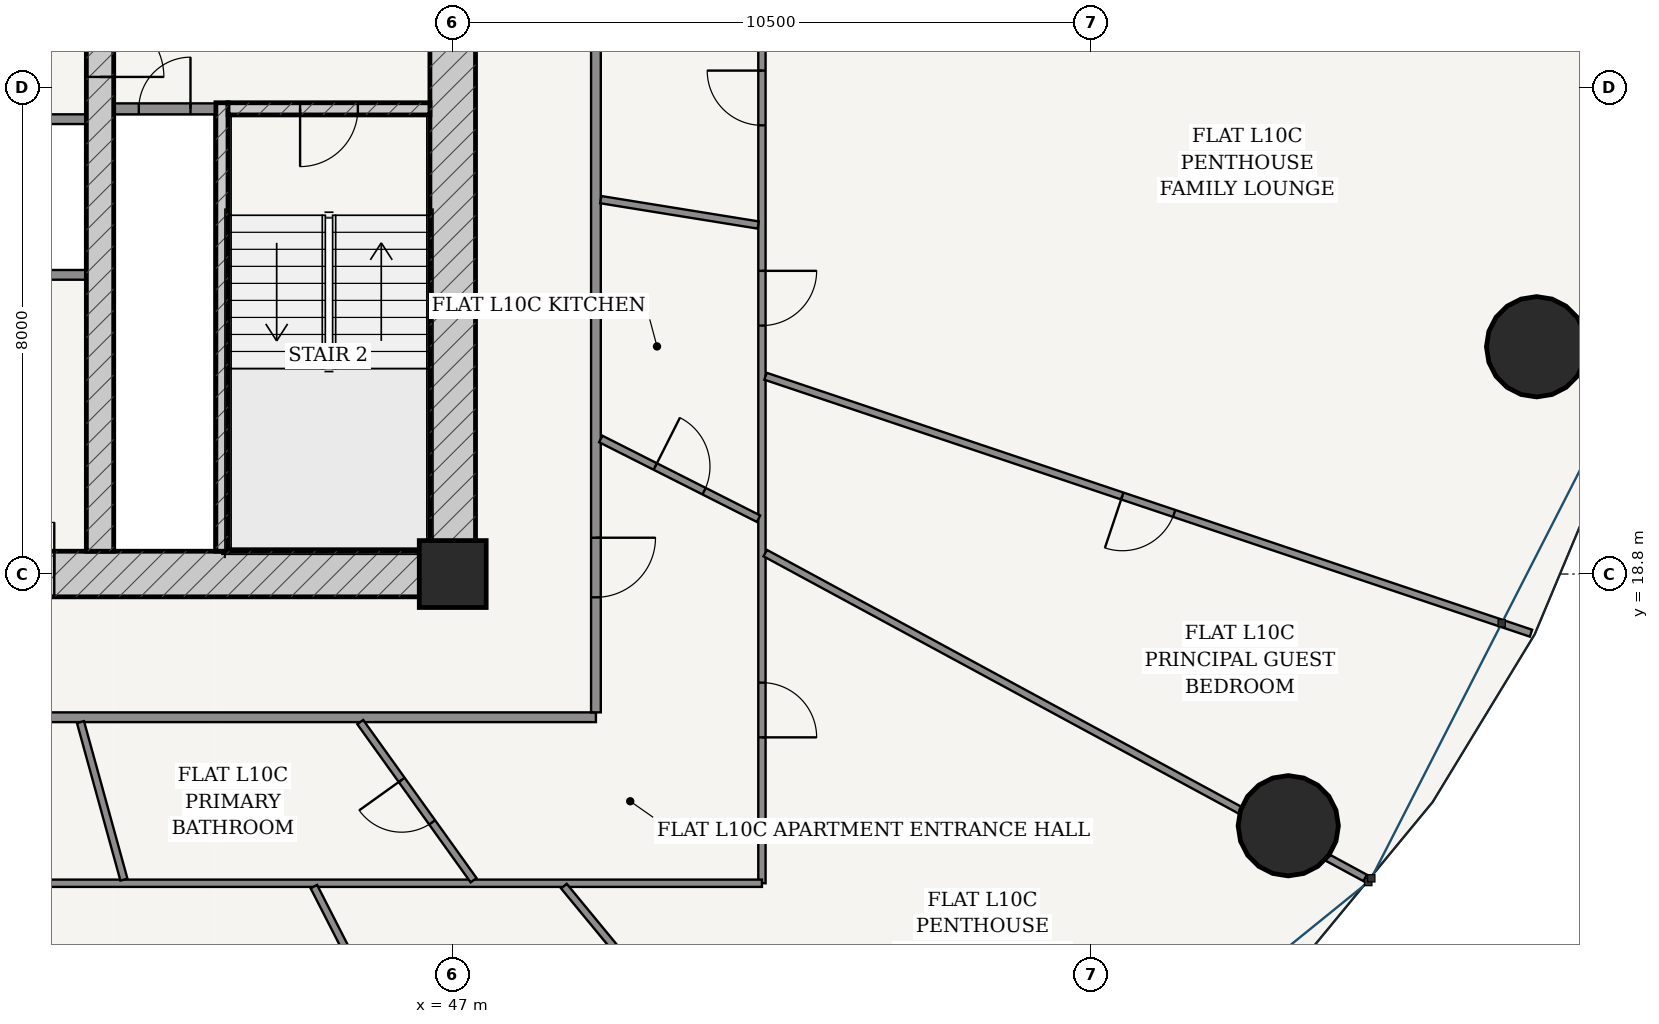
"""IFC4 building model, lengths in metres.
Left out: names, types, materials, properties, quantities, classifications, styles, units other than length and angle.
Written with IfcOpenShell. Run it as: python <this file> out.ifc"""

import sys

from ifc_helpers import new_model, si_unit, direction, frame, frame_2d, origin, origin_2d, place, context, subcontext, project, spatial, rectangle, hollow_circle, extrude, source, transform, mapped, element, fill, save


model = new_model("IFC4")
c1 = context("Model", 3, precision=1e-05, world=origin(), true_north=direction((-0.2419218956, 0.970295726276)))
c2 = subcontext(c1, "Body", "Model", "MODEL_VIEW")
j1 = project(units=[si_unit("LENGTHUNIT", "METRE"), si_unit("PLANEANGLEUNIT", "RADIAN")], contexts=[c1])
p1 = place(None, origin())
s1 = spatial("IfcSite", under=j1, at=p1, CompositionType="ELEMENT")
p2 = place(p1, origin())
s2 = spatial("IfcBuilding", under=s1, at=p2, CompositionType="ELEMENT")
p3 = place(p2, frame((0.0, 0.0, 42.0)))
s3 = spatial("IfcBuildingStorey", under=s2, at=p3, CompositionType="ELEMENT", Elevation=42.0)
p4 = place(p3, frame((47.0, 18.8, 0.0), z_axis=(0.0, 0.0, 1.0), x_axis=(1.0, 0.0, 0.0)))
e1 = element("IfcColumn", 1, at=p4, inside=s3, PredefinedType="COLUMN", context=c2, shape_type="SweptSolid", body=[
    extrude(rectangle(XDim=1.1, YDim=1.1, at=origin_2d()), origin(), (0.0, 0.0, 1.0), 3.6),
])
p5 = place(p3, frame((28.625, 18.8, 0.0), z_axis=(0.0, 0.0, 1.0), x_axis=(1.0, 0.0, 0.0)))
e2 = element("IfcWall", 2, at=p5, inside=s3, PredefinedType="SHEAR", context=c2, shape_type="SweptSolid", body=[
    extrude(rectangle(XDim=18.75, YDim=0.75, at=frame_2d((9.375, 0.0))), origin(), (0.0, 0.0, 1.0), 3.32),
])
p6 = place(p5, frame((6.927, 0.0, 0.0)))
e3 = element("IfcOpeningElement", 3, at=p6, cuts=e2, PredefinedType="OPENING", context=c2, shape_type="SweptSolid", body=[
    extrude(rectangle(XDim=0.85, YDim=2.1, at=frame_2d((0.425, 1.05))), frame((0.0, 0.385, 0.0), z_axis=(0.0, -1.0, 0.0), x_axis=(1.0, 0.0, 0.0)), (0.0, 0.0, 1.0), 0.77),
])
p7 = place(p5, frame((8.95, 0.0, 0.0)))
e4 = element("IfcOpeningElement", 4, at=p7, cuts=e2, PredefinedType="OPENING", context=c2, shape_type="SweptSolid", body=[
    extrude(rectangle(XDim=0.85, YDim=2.1, at=frame_2d((0.425, 1.05))), frame((0.0, 0.385, 0.0), z_axis=(0.0, -1.0, 0.0), x_axis=(1.0, 0.0, 0.0)), (0.0, 0.0, 1.0), 0.77),
])
p8 = place(p5, frame((10.972, 0.0, 0.0)))
e5 = element("IfcOpeningElement", 5, at=p8, cuts=e2, PredefinedType="OPENING", context=c2, shape_type="SweptSolid", body=[
    extrude(rectangle(XDim=0.85, YDim=2.1, at=frame_2d((0.425, 1.05))), frame((0.0, 0.385, 0.0), z_axis=(0.0, -1.0, 0.0), x_axis=(1.0, 0.0, 0.0)), (0.0, 0.0, 1.0), 0.77),
])
p9 = place(p3, frame((47.0, 19.175, 0.0), z_axis=(0.0, 0.0, 1.0), x_axis=(0.0, 1.0, 0.0)))
e6 = element("IfcWall", 6, at=p9, inside=s3, PredefinedType="SHEAR", context=c2, shape_type="SweptSolid", body=[
    extrude(rectangle(XDim=15.25, YDim=0.75, at=frame_2d((7.625, 0.0))), origin(), (0.0, 0.0, 1.0), 3.32),
])
p10 = place(p9, frame((9.875, 0.0, 0.0)))
e7 = element("IfcOpeningElement", 7, at=p10, cuts=e6, PredefinedType="OPENING", context=c2, shape_type="SweptSolid", body=[
    extrude(rectangle(XDim=1.5, YDim=2.2, at=frame_2d((0.75, 1.1))), frame((0.0, 0.385, 0.0), z_axis=(0.0, -1.0, 0.0), x_axis=(1.0, 0.0, 0.0)), (0.0, 0.0, 1.0), 0.77),
])
p11 = place(p3, frame((43.205, 19.175, 0.0), z_axis=(0.0, 0.0, 1.0), x_axis=(0.0, 1.0, 0.0)))
e8 = element("IfcWall", 8, at=p11, inside=s3, PredefinedType="SOLIDWALL", context=c2, shape_type="SweptSolid", body=[
    extrude(rectangle(XDim=7.375, YDim=0.2, at=frame_2d((3.688, 0.0))), origin(), (0.0, 0.0, 1.0), 3.32),
])
p12 = place(p3, frame((43.305, 26.45, 0.0), z_axis=(0.0, 0.0, 1.0), x_axis=(1.0, 0.0, 0.0)))
e9 = element("IfcWall", 9, at=p12, inside=s3, PredefinedType="SOLIDWALL", context=c2, shape_type="SweptSolid", body=[
    extrude(rectangle(XDim=3.32, YDim=0.2, at=frame_2d((1.66, 0.0))), origin(), (0.0, 0.0, 1.0), 3.32),
])
p13 = place(p12, frame((1.185, 0.0, 0.0)))
e10 = element("IfcOpeningElement", 10, at=p13, cuts=e9, PredefinedType="OPENING", context=c2, shape_type="SweptSolid", body=[
    extrude(rectangle(XDim=0.95, YDim=2.15, at=frame_2d((0.475, 1.075))), frame((0.0, 0.11, 0.0), z_axis=(0.0, -1.0, 0.0), x_axis=(1.0, 0.0, 0.0)), (0.0, 0.0, 1.0), 0.22),
])
p14 = place(p3, frame((41.2, 19.175, 0.0), z_axis=(0.0, 0.0, 1.0), x_axis=(0.0, 1.0, 0.0)))
e11 = element("IfcWall", 11, at=p14, inside=s3, PredefinedType="SHEAR", context=c2, shape_type="SweptSolid", body=[
    extrude(rectangle(XDim=15.25, YDim=0.45, at=frame_2d((7.625, 0.0))), origin(), (0.0, 0.0, 1.0), 3.32),
])
p15 = place(p14, frame((7.8, 0.0, 0.0)))
e12 = element("IfcOpeningElement", 12, at=p15, cuts=e11, PredefinedType="OPENING", context=c2, shape_type="SweptSolid", body=[
    extrude(rectangle(XDim=1.05, YDim=2.15, at=frame_2d((0.525, 1.075))), frame((0.0, 0.235, 0.0), z_axis=(0.0, -1.0, 0.0), x_axis=(1.0, 0.0, 0.0)), (0.0, 0.0, 1.0), 0.47),
])
for number, where, z_axis, x_axis in (
    (13, (60.741, 14.661, 0.0), (0.0, 0.0, 1.0), (1.0, 0.0, 0.0)),
    (14, (64.824, 22.537, 0.0), (0.0, 0.0, 1.0), (1.0, 0.0, 0.0)),
):
    element("IfcColumn", number, at=place(p3, frame(where, z_axis=z_axis, x_axis=x_axis)), inside=s3, PredefinedType="COLUMN", context=c2, shape_type="SweptSolid", body=[
        extrude(hollow_circle(Radius=0.825, WallThickness=0.05, at=origin_2d()), origin(), (0.0, 0.0, 1.0), 3.6),
    ])
p16 = place(p3, frame((41.425, 26.45, 0.0), z_axis=(0.0, 0.0, 1.0), x_axis=(1.0, 0.0, 0.0)))
e15 = element("IfcWall", 15, at=p16, inside=s3, PredefinedType="PARTITIONING", context=c2, shape_type="SweptSolid", body=[
    extrude(rectangle(XDim=1.675, YDim=0.18, at=frame_2d((0.837, 0.0))), origin(), (0.0, 0.0, 1.0), 3.32),
])
p17 = place(p16, frame((0.413, 0.0, 0.0)))
e16 = element("IfcOpeningElement", 16, at=p17, cuts=e15, PredefinedType="OPENING", context=c2, shape_type="SweptSolid", body=[
    extrude(rectangle(XDim=0.85, YDim=2.1, at=frame_2d((0.425, 1.05))), frame((0.0, 0.1, 0.0), z_axis=(0.0, -1.0, 0.0), x_axis=(1.0, 0.0, 0.0)), (0.0, 0.0, 1.0), 0.2),
])
for number, where, z_axis, x_axis in (
    (17, (35.025, 26.28, 0.0), (0.0, 0.0, 1.0), (1.0, 0.0, 0.0)),
    (18, (35.025, 23.72, 0.0), (0.0, 0.0, 1.0), (1.0, 0.0, 0.0)),
):
    element("IfcWall", number, at=place(p3, frame(where, z_axis=z_axis, x_axis=x_axis)), inside=s3, PredefinedType="PARTITIONING", context=c2, shape_type="SweptSolid", body=[
        extrude(rectangle(XDim=5.95, YDim=0.16, at=frame_2d((2.975, 0.0))), origin(), (0.0, 0.0, 1.0), 3.32),
    ])
p18 = place(p3, frame((26.645, 16.445, 0.0), z_axis=(0.0, 0.0, 1.0), x_axis=(1.0, 0.0, 0.0)))
e19 = element("IfcWall", 19, at=p18, inside=s3, PredefinedType="PARTITIONING", context=c2, shape_type="SweptSolid", body=[
    extrude(rectangle(XDim=22.71, YDim=0.16, at=frame_2d((11.355, 0.0))), origin(), (0.0, 0.0, 1.0), 2.688),
])
p19 = place(p3, frame((49.355, 16.525, 0.0), z_axis=(0.0, 0.0, 1.0), x_axis=(0.0, 1.0, 0.0)))
e20 = element("IfcWall", 20, at=p19, inside=s3, PredefinedType="PARTITIONING", context=c2, shape_type="SweptSolid", body=[
    extrude(rectangle(XDim=20.55, YDim=0.16, at=frame_2d((10.275, 0.0))), origin(), (0.0, 0.0, 1.0), 2.688),
])
p20 = place(p19, frame((17.207, 0.0, 0.0)))
e21 = element("IfcOpeningElement", 21, at=p20, cuts=e20, PredefinedType="OPENING", context=c2, shape_type="SweptSolid", body=[
    extrude(rectangle(XDim=0.98, YDim=2.2, at=frame_2d((0.49, 1.1))), frame((0.0, 0.09, 0.0), z_axis=(0.0, -1.0, 0.0), x_axis=(1.0, 0.0, 0.0)), (0.0, 0.0, 1.0), 0.18),
])
p21 = place(p19, frame((1.892, 0.0, 0.0)))
e22 = element("IfcOpeningElement", 22, at=p21, cuts=e20, PredefinedType="OPENING", context=c2, shape_type="SweptSolid", body=[
    extrude(rectangle(XDim=0.98, YDim=2.2, at=frame_2d((0.49, 1.1))), frame((0.0, 0.09, 0.0), z_axis=(0.0, -1.0, 0.0), x_axis=(1.0, 0.0, 0.0)), (0.0, 0.0, 1.0), 0.18),
])
p22 = place(p3, frame((52.085, 28.968, 0.0), z_axis=(0.0, 0.0, 1.0), x_axis=(0.0, -1.0, 0.0)))
e23 = element("IfcWall", 23, at=p22, inside=s3, PredefinedType="PARTITIONING", context=c2, shape_type="SweptSolid", body=[
    extrude(rectangle(XDim=15.253, YDim=0.12, at=frame_2d((7.626, 0.0))), origin(), (0.0, 0.0, 1.0), 2.688),
])
p23 = place(p22, frame((11.954, 0.0, 0.0)))
e24 = element("IfcOpeningElement", 24, at=p23, cuts=e23, PredefinedType="OPENING", context=c2, shape_type="SweptSolid", body=[
    extrude(rectangle(XDim=0.9, YDim=2.15, at=frame_2d((0.45, 1.075))), frame((0.0, 0.07, 0.0), z_axis=(0.0, -1.0, 0.0), x_axis=(1.0, 0.0, 0.0)), (0.0, 0.0, 1.0), 0.14),
])
p24 = place(p22, frame((5.182, 0.0, 0.0)))
e25 = element("IfcOpeningElement", 25, at=p24, cuts=e23, PredefinedType="OPENING", context=c2, shape_type="SweptSolid", body=[
    extrude(rectangle(XDim=0.9, YDim=2.15, at=frame_2d((0.45, 1.075))), frame((0.0, 0.07, 0.0), z_axis=(0.0, -1.0, 0.0), x_axis=(1.0, 0.0, 0.0)), (0.0, 0.0, 1.0), 0.14),
])
p25 = place(p22, frame((1.889, 0.0, 0.0)))
e26 = element("IfcOpeningElement", 26, at=p25, cuts=e23, PredefinedType="OPENING", context=c2, shape_type="SweptSolid", body=[
    extrude(rectangle(XDim=0.9, YDim=2.15, at=frame_2d((0.45, 1.075))), frame((0.0, 0.07, 0.0), z_axis=(0.0, -1.0, 0.0), x_axis=(1.0, 0.0, 0.0)), (0.0, 0.0, 1.0), 0.14),
])
p26 = place(p3, frame((52.085, 13.715, 0.0), z_axis=(0.0, 0.0, 1.0), x_axis=(-1.0, 0.0, 0.0)))
e27 = element("IfcWall", 27, at=p26, inside=s3, PredefinedType="PARTITIONING", context=c2, shape_type="SweptSolid", body=[
    extrude(rectangle(XDim=24.772, YDim=0.12, at=frame_2d((12.386, 0.0))), origin(), (0.0, 0.0, 1.0), 2.688),
])
p27 = place(p26, frame((20.912, 0.0, 0.0)))
e28 = element("IfcOpeningElement", 28, at=p27, cuts=e27, PredefinedType="OPENING", context=c2, shape_type="SweptSolid", body=[
    extrude(rectangle(XDim=0.86, YDim=2.15, at=frame_2d((0.43, 1.075))), frame((0.0, 0.07, 0.0), z_axis=(0.0, -1.0, 0.0), x_axis=(1.0, 0.0, 0.0)), (0.0, 0.0, 1.0), 0.14),
])
p28 = place(p26, frame((13.87, 0.0, 0.0)))
e29 = element("IfcOpeningElement", 29, at=p28, cuts=e27, PredefinedType="OPENING", context=c2, shape_type="SweptSolid", body=[
    extrude(rectangle(XDim=0.9, YDim=2.15, at=frame_2d((0.45, 1.075))), frame((0.0, 0.07, 0.0), z_axis=(0.0, -1.0, 0.0), x_axis=(1.0, 0.0, 0.0)), (0.0, 0.0, 1.0), 0.14),
])
p29 = place(p3, frame((44.717, 13.66, 0.0), z_axis=(0.0, 0.0, 1.0), x_axis=(0.455131303234, -0.890424335256, 0.0)))
e30 = element("IfcWall", 30, at=p29, inside=s3, PredefinedType="PARTITIONING", context=c2, shape_type="SweptSolid", body=[
    extrude(rectangle(XDim=9.562, YDim=0.12, at=frame_2d((4.781, 0.0))), origin(), (0.0, 0.0, 1.0), 2.762),
])
p30 = place(p29, frame((4.331, 0.0, 0.0)))
e31 = element("IfcOpeningElement", 31, at=p30, cuts=e30, PredefinedType="OPENING", context=c2, shape_type="SweptSolid", body=[
    extrude(rectangle(XDim=0.9, YDim=2.15, at=frame_2d((0.45, 1.075))), frame((0.0, 0.07, 0.0), z_axis=(0.0, -1.0, 0.0), x_axis=(1.0, 0.0, 0.0)), (0.0, 0.0, 1.0), 0.14),
])
p31 = place(p3, frame((48.829, 13.667, 0.0), z_axis=(0.0, 0.0, 1.0), x_axis=(0.636177533893, -0.771542704826, 0.0)))
e32 = element("IfcWall", 32, at=p31, inside=s3, PredefinedType="PARTITIONING", context=c2, shape_type="SweptSolid", body=[
    extrude(rectangle(XDim=8.187, YDim=0.12, at=frame_2d((4.093, 0.0))), origin(), (0.0, 0.0, 1.0), 2.688),
])
p32 = place(p31, frame((2.584, 0.0, 0.0)))
e33 = element("IfcOpeningElement", 33, at=p32, cuts=e32, PredefinedType="OPENING", context=c2, shape_type="SweptSolid", body=[
    extrude(rectangle(XDim=0.9, YDim=2.15, at=frame_2d((0.45, 1.075))), frame((0.0, 0.07, 0.0), z_axis=(0.0, -1.0, 0.0), x_axis=(1.0, 0.0, 0.0)), (0.0, 0.0, 1.0), 0.14),
])
p33 = place(p3, frame((52.139, 19.144, 0.0), z_axis=(0.0, 0.0, 1.0), x_axis=(0.879372452045, -0.476134529922, 0.0)))
e34 = element("IfcWall", 34, at=p33, inside=s3, PredefinedType="PARTITIONING", context=c2, shape_type="SweptSolid", body=[
    extrude(rectangle(XDim=11.219, YDim=0.12, at=frame_2d((5.61, 0.0))), origin(), (0.0, 0.0, 1.0), 2.688),
])
p34 = place(p3, frame((52.144, 22.052, 0.0), z_axis=(0.0, 0.0, 1.0), x_axis=(0.948023034133, -0.318201707653, 0.0)))
e35 = element("IfcWall", 35, at=p34, inside=s3, PredefinedType="PARTITIONING", context=c2, shape_type="SweptSolid", body=[
    extrude(rectangle(XDim=13.279, YDim=0.12, at=frame_2d((6.639, 0.0))), origin(), (0.0, 0.0, 1.0), 2.762),
])
p35 = place(p34, frame((6.189, 0.0, 0.0)))
e36 = element("IfcOpeningElement", 36, at=p35, cuts=e35, PredefinedType="OPENING", context=c2, shape_type="SweptSolid", body=[
    extrude(rectangle(XDim=0.9, YDim=2.15, at=frame_2d((0.45, 1.075))), frame((0.0, 0.07, 0.0), z_axis=(0.0, -1.0, 0.0), x_axis=(1.0, 0.0, 0.0)), (0.0, 0.0, 1.0), 0.14),
])
p36 = place(p3, frame((40.878, 16.365, 0.0), z_axis=(0.0, 0.0, 1.0), x_axis=(0.265853298244, -0.964013497734, 0.0)))
e37 = element("IfcWall", 37, at=p36, inside=s3, PredefinedType="PARTITIONING", context=c2, shape_type="SweptSolid", body=[
    extrude(rectangle(XDim=2.687, YDim=0.12, at=frame_2d((1.344, 0.0))), origin(), (0.0, 0.0, 1.0), 3.32),
])
p37 = place(p3, frame((45.48, 16.365, 0.0), z_axis=(0.0, 0.0, 1.0), x_axis=(0.582566008831, -0.812783393872, 0.0)))
e38 = element("IfcWall", 38, at=p37, inside=s3, PredefinedType="PARTITIONING", context=c2, shape_type="SweptSolid", body=[
    extrude(rectangle(XDim=3.198, YDim=0.12, at=frame_2d((1.599, 0.0))), origin(), (0.0, 0.0, 1.0), 3.32),
])
p38 = place(p37, frame((1.169, 0.0, 0.0)))
e39 = element("IfcOpeningElement", 39, at=p38, cuts=e38, PredefinedType="OPENING", context=c2, shape_type="SweptSolid", body=[
    extrude(rectangle(XDim=0.86, YDim=2.15, at=frame_2d((0.43, 1.075))), frame((0.0, 0.07, 0.0), z_axis=(0.0, -1.0, 0.0), x_axis=(1.0, 0.0, 0.0)), (0.0, 0.0, 1.0), 0.14),
])
p39 = place(p3, frame((49.435, 21.021, 0.0), z_axis=(0.0, 0.0, 1.0), x_axis=(0.892504324967, -0.451038834155, 0.0)))
e40 = element("IfcWall", 40, at=p39, inside=s3, PredefinedType="PARTITIONING", context=c2, shape_type="SweptSolid", body=[
    extrude(rectangle(XDim=2.907, YDim=0.12, at=frame_2d((1.454, 0.0))), origin(), (0.0, 0.0, 1.0), 3.32),
])
p40 = place(p39, frame((1.004, 0.0, 0.0)))
e41 = element("IfcOpeningElement", 41, at=p40, cuts=e40, PredefinedType="OPENING", context=c2, shape_type="SweptSolid", body=[
    extrude(rectangle(XDim=0.9, YDim=2.15, at=frame_2d((0.45, 1.075))), frame((0.0, 0.07, 0.0), z_axis=(0.0, -1.0, 0.0), x_axis=(1.0, 0.0, 0.0)), (0.0, 0.0, 1.0), 0.14),
])
p41 = place(p3, frame((49.435, 24.957, 0.0), z_axis=(0.0, 0.0, 1.0), x_axis=(0.987258113076, -0.159127050386, 0.0)))
e42 = element("IfcWall", 42, at=p41, inside=s3, PredefinedType="PARTITIONING", context=c2, shape_type="SweptSolid", body=[
    extrude(rectangle(XDim=2.622, YDim=0.12, at=frame_2d((1.311, 0.0))), origin(), (0.0, 0.0, 1.0), 2.688),
])
m1 = source(origin(), c2, "Body", "SweptSolid", [
    extrude(rectangle(XDim=1.05, YDim=2.15, at=frame_2d((0.525, 1.075))), frame((0.0, 0.025, 0.0), z_axis=(0.0, -1.0, 0.0), x_axis=(1.0, 0.0, 0.0)), (0.0, 0.0, 1.0), 0.05),
])
p42 = place(p15, frame((1.05, 0.0, 0.0), z_axis=(0.0, 0.0, 1.0), x_axis=(-1.0, 0.0, 0.0)))
e43 = element("IfcDoor", 43, at=p42, inside=s3, OperationType="SINGLE_SWING_RIGHT", PredefinedType="DOOR", context=c2, shape_type="MappedRepresentation", body=[
    mapped(m1, transform((0.0, 0.0, 0.0), scale=1.0)),
])
fill(e12, e43)
m2 = source(origin(), c2, "Body", "SweptSolid", [
    extrude(rectangle(XDim=0.95, YDim=2.15, at=frame_2d((0.475, 1.075))), frame((0.0, 0.025, 0.0), z_axis=(0.0, -1.0, 0.0), x_axis=(1.0, 0.0, 0.0)), (0.0, 0.0, 1.0), 0.05),
])
p43 = place(p13, frame((0.95, 0.0, 0.0), z_axis=(0.0, 0.0, 1.0), x_axis=(-1.0, 0.0, 0.0)))
e44 = element("IfcDoor", 44, at=p43, inside=s3, OperationType="SINGLE_SWING_RIGHT", PredefinedType="DOOR", context=c2, shape_type="MappedRepresentation", body=[
    mapped(m2, transform((0.0, 0.0, 0.0), scale=1.0)),
])
fill(e10, e44)
m3 = source(origin(), c2, "Body", "SweptSolid", [
    extrude(rectangle(XDim=0.85, YDim=2.1, at=frame_2d((0.425, 1.05))), frame((0.0, 0.025, 0.0), z_axis=(0.0, -1.0, 0.0), x_axis=(1.0, 0.0, 0.0)), (0.0, 0.0, 1.0), 0.05),
])
p44 = place(p17, origin())
e45 = element("IfcDoor", 45, at=p44, inside=s3, OperationType="SINGLE_SWING_RIGHT", PredefinedType="DOOR", context=c2, shape_type="MappedRepresentation", body=[
    mapped(m3, transform((0.0, 0.0, 0.0), scale=1.0)),
])
fill(e16, e45)
p45 = place(p8, origin())
e46 = element("IfcDoor", 46, at=p45, inside=s3, OperationType="SINGLE_SWING_RIGHT", PredefinedType="DOOR", context=c2, shape_type="MappedRepresentation", body=[
    mapped(m3, transform((0.0, 0.0, 0.0), scale=1.0)),
])
fill(e5, e46)
m4 = source(origin(), c2, "Body", "SweptSolid", [
    extrude(rectangle(XDim=0.98, YDim=2.2, at=frame_2d((0.49, 1.1))), frame((0.0, 0.025, 0.0), z_axis=(0.0, -1.0, 0.0), x_axis=(1.0, 0.0, 0.0)), (0.0, 0.0, 1.0), 0.05),
])
p46 = place(p21, frame((0.98, 0.0, 0.0), z_axis=(0.0, 0.0, 1.0), x_axis=(-1.0, 0.0, 0.0)))
e47 = element("IfcDoor", 47, at=p46, inside=s3, OperationType="SINGLE_SWING_LEFT", PredefinedType="DOOR", context=c2, shape_type="MappedRepresentation", body=[
    mapped(m4, transform((0.0, 0.0, 0.0), scale=1.0)),
])
fill(e22, e47)
m5 = source(origin(), c2, "Body", "SweptSolid", [
    extrude(rectangle(XDim=0.86, YDim=2.15, at=frame_2d((0.43, 1.075))), frame((0.0, 0.025, 0.0), z_axis=(0.0, -1.0, 0.0), x_axis=(1.0, 0.0, 0.0)), (0.0, 0.0, 1.0), 0.05),
])
p47 = place(p38, frame((0.86, 0.0, 0.0), z_axis=(0.0, 0.0, 1.0), x_axis=(-1.0, 0.0, 0.0)))
e48 = element("IfcDoor", 48, at=p47, inside=s3, OperationType="SINGLE_SWING_RIGHT", PredefinedType="DOOR", context=c2, shape_type="MappedRepresentation", body=[
    mapped(m5, transform((0.0, 0.0, 0.0), scale=1.0)),
])
fill(e39, e48)
m6 = source(origin(), c2, "Body", "SweptSolid", [
    extrude(rectangle(XDim=0.9, YDim=2.15, at=frame_2d((0.45, 1.075))), frame((0.0, 0.025, 0.0), z_axis=(0.0, -1.0, 0.0), x_axis=(1.0, 0.0, 0.0)), (0.0, 0.0, 1.0), 0.05),
])
p48 = place(p40, origin())
e49 = element("IfcDoor", 49, at=p48, inside=s3, OperationType="SINGLE_SWING_LEFT", PredefinedType="DOOR", context=c2, shape_type="MappedRepresentation", body=[
    mapped(m6, transform((0.0, 0.0, 0.0), scale=1.0)),
])
fill(e41, e49)
p49 = place(p23, origin())
e50 = element("IfcDoor", 50, at=p49, inside=s3, OperationType="SINGLE_SWING_RIGHT", PredefinedType="DOOR", context=c2, shape_type="MappedRepresentation", body=[
    mapped(m6, transform((0.0, 0.0, 0.0), scale=1.0)),
])
fill(e24, e50)
p50 = place(p24, origin())
e51 = element("IfcDoor", 51, at=p50, inside=s3, OperationType="SINGLE_SWING_LEFT", PredefinedType="DOOR", context=c2, shape_type="MappedRepresentation", body=[
    mapped(m6, transform((0.0, 0.0, 0.0), scale=1.0)),
])
fill(e25, e51)
p51 = place(p25, frame((0.9, 0.0, 0.0), z_axis=(0.0, 0.0, 1.0), x_axis=(-1.0, 0.0, 0.0)))
e52 = element("IfcDoor", 52, at=p51, inside=s3, OperationType="SINGLE_SWING_RIGHT", PredefinedType="DOOR", context=c2, shape_type="MappedRepresentation", body=[
    mapped(m6, transform((0.0, 0.0, 0.0), scale=1.0)),
])
fill(e26, e52)
p52 = place(p35, frame((0.9, 0.0, 0.0), z_axis=(0.0, 0.0, 1.0), x_axis=(-1.0, 0.0, 0.0)))
e53 = element("IfcDoor", 53, at=p52, inside=s3, OperationType="SINGLE_SWING_RIGHT", PredefinedType="DOOR", context=c2, shape_type="MappedRepresentation", body=[
    mapped(m6, transform((0.0, 0.0, 0.0), scale=1.0)),
])
fill(e36, e53)
save(model, sys.argv[1])
